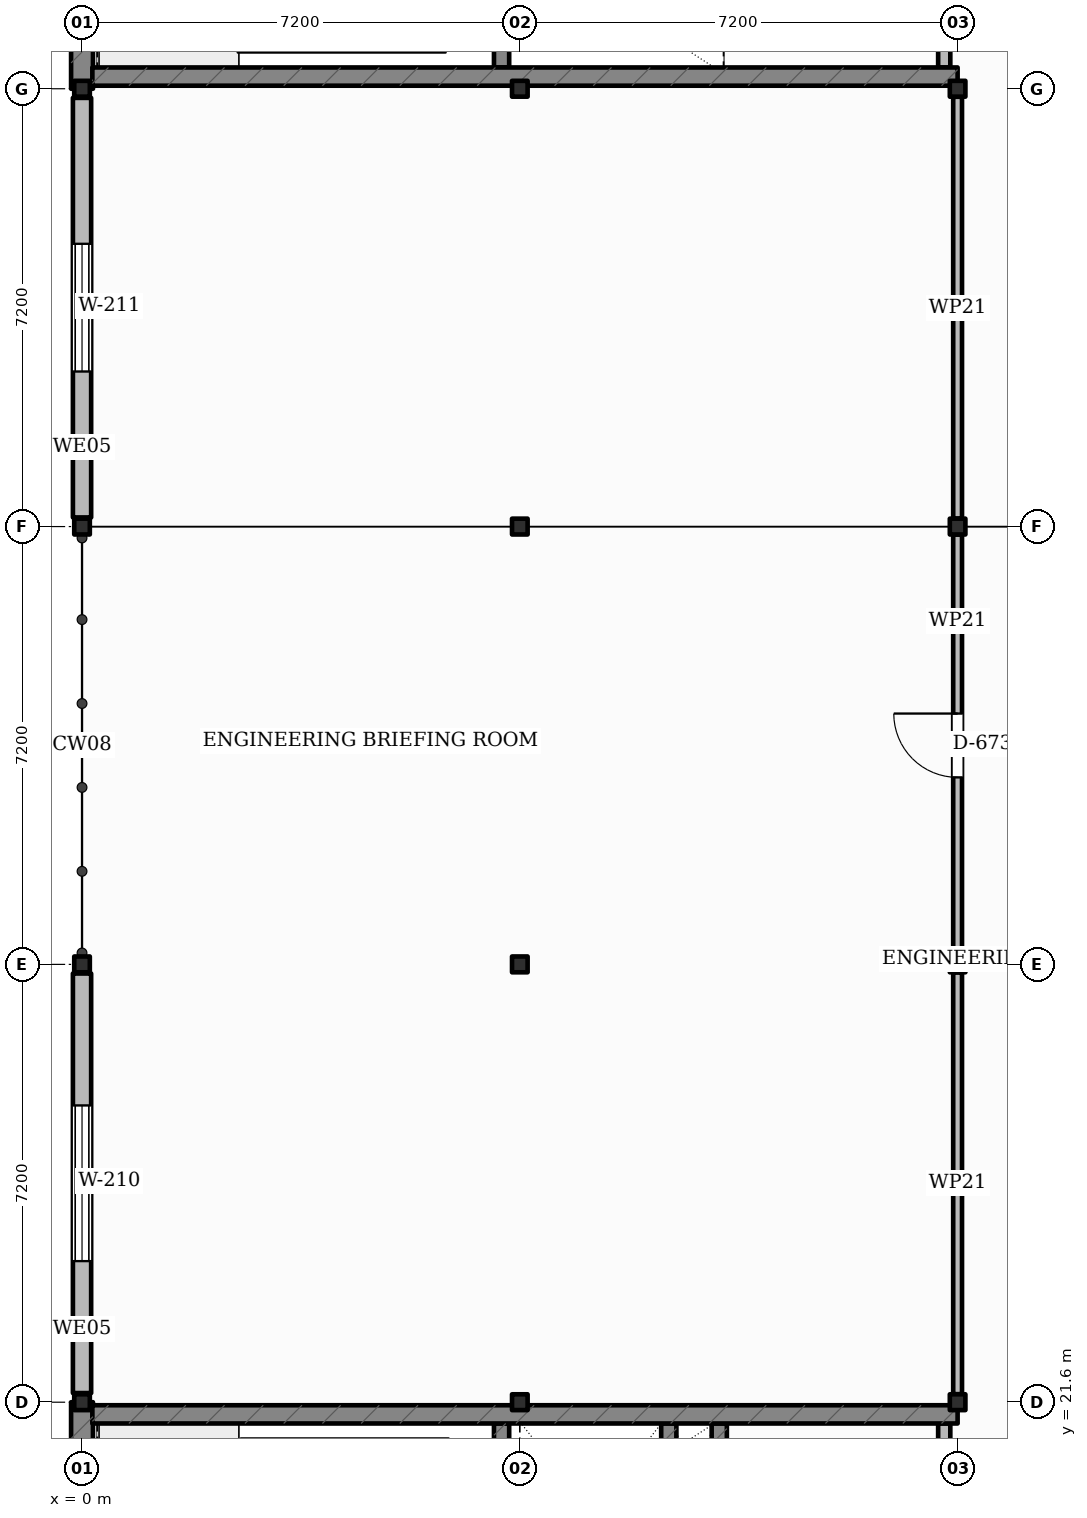
"""IFC4 building model, lengths in metres.
Left out: names, types, materials, properties, quantities, classifications, styles, units other than length and angle.
Written with IfcOpenShell. Run it as: python <this file> out.ifc"""

import sys

from ifc_helpers import new_model, si_unit, direction, frame, frame_2d, origin, origin_2d, place, context, subcontext, project, spatial, rectangle, i_section, extrude, element, fill, save


model = new_model("IFC4")
c1 = context("Model", 3, precision=1e-05, world=origin(), true_north=direction((0.0, 1.0)))
c2 = subcontext(c1, "Body", "Model", "MODEL_VIEW")
j1 = project(units=[si_unit("LENGTHUNIT", "METRE"), si_unit("PLANEANGLEUNIT", "RADIAN")], contexts=[c1])
p1 = place(None, origin())
s1 = spatial("IfcSite", under=j1, at=p1, CompositionType="ELEMENT")
p2 = place(p1, origin())
s2 = spatial("IfcBuilding", under=s1, at=p2, CompositionType="ELEMENT")
p3 = place(p2, frame((0.0, 0.0, 14.4)))
s3 = spatial("IfcBuildingStorey", under=s2, at=p3, CompositionType="ELEMENT", Elevation=14.4)
for number, where, z_axis, x_axis in (
    (1, (0.0, 21.6, 0.0), (0.0, 0.0, 1.0), (1.0, 0.0, 0.0)),
    (2, (0.0, 28.8, 0.0), (0.0, 0.0, 1.0), (1.0, 0.0, 0.0)),
    (3, (0.0, 36.0, 0.0), (0.0, 0.0, 1.0), (1.0, 0.0, 0.0)),
    (4, (0.0, 43.2, 0.0), (0.0, 0.0, 1.0), (1.0, 0.0, 0.0)),
    (5, (7.2, 21.6, 0.0), (0.0, 0.0, 1.0), (1.0, 0.0, 0.0)),
    (6, (7.2, 28.8, 0.0), (0.0, 0.0, 1.0), (1.0, 0.0, 0.0)),
    (7, (7.2, 36.0, 0.0), (0.0, 0.0, 1.0), (1.0, 0.0, 0.0)),
    (8, (7.2, 43.2, 0.0), (0.0, 0.0, 1.0), (1.0, 0.0, 0.0)),
    (9, (14.4, 21.6, 0.0), (0.0, 0.0, 1.0), (1.0, 0.0, 0.0)),
    (10, (14.4, 28.8, 0.0), (0.0, 0.0, 1.0), (1.0, 0.0, 0.0)),
    (11, (14.4, 36.0, 0.0), (0.0, 0.0, 1.0), (1.0, 0.0, 0.0)),
    (12, (14.4, 43.2, 0.0), (0.0, 0.0, 1.0), (1.0, 0.0, 0.0)),
):
    element("IfcColumn", number, at=place(p3, frame(where, z_axis=z_axis, x_axis=x_axis)), inside=s3, PredefinedType="COLUMN", context=c2, shape_type="SweptSolid", body=[
        extrude(i_section(OverallWidth=0.256, OverallDepth=0.26, WebThickness=0.01, FlangeThickness=0.017, FilletRadius=0.013, at=origin_2d()), origin(), (0.0, 0.0, 1.0), 4.5),
    ])
p4 = place(p3, frame((0.0, 14.4, 0.0), z_axis=(0.0, 0.0, 1.0), x_axis=(0.0, 1.0, 0.0)))
e13 = element("IfcWall", 13, at=p4, inside=s3, PredefinedType="SHEAR", context=c2, shape_type="SweptSolid", body=[
    extrude(rectangle(XDim=7.2, YDim=0.36, at=frame_2d((3.6, 0.0))), origin(), (0.0, 0.0, 1.0), 3.85),
])
p5 = place(p3, frame((0.0, 21.75, 0.0), z_axis=(0.0, 0.0, 1.0), x_axis=(0.0, 1.0, 0.0)))
e14 = element("IfcWall", 14, at=p5, inside=s3, PredefinedType="SOLIDWALL", context=c2, shape_type="SweptSolid", body=[
    extrude(rectangle(XDim=6.9, YDim=0.3, at=frame_2d((3.45, 0.0))), origin(), (0.0, 0.0, 1.0), 3.85),
])
p6 = place(p5, frame((2.17, 0.0, 1.05)))
e15 = element("IfcOpeningElement", 15, at=p6, cuts=e14, PredefinedType="OPENING", context=c2, shape_type="SweptSolid", body=[
    extrude(rectangle(XDim=2.56, YDim=1.55, at=frame_2d((1.28, 0.775))), frame((0.0, 0.16, 0.0), z_axis=(0.0, -1.0, 0.0), x_axis=(1.0, 0.0, 0.0)), (0.0, 0.0, 1.0), 0.32),
])
p7 = place(p3, frame((0.0, 36.15, 0.0), z_axis=(0.0, 0.0, 1.0), x_axis=(0.0, 1.0, 0.0)))
e16 = element("IfcWall", 16, at=p7, inside=s3, PredefinedType="SOLIDWALL", context=c2, shape_type="SweptSolid", body=[
    extrude(rectangle(XDim=6.9, YDim=0.3, at=frame_2d((3.45, 0.0))), origin(), (0.0, 0.0, 1.0), 3.85),
])
p8 = place(p7, frame((2.4, 0.0, 1.05)))
e17 = element("IfcOpeningElement", 17, at=p8, cuts=e16, PredefinedType="OPENING", context=c2, shape_type="SweptSolid", body=[
    extrude(rectangle(XDim=2.1, YDim=1.8, at=frame_2d((1.05, 0.9))), frame((0.0, 0.16, 0.0), z_axis=(0.0, -1.0, 0.0), x_axis=(1.0, 0.0, 0.0)), (0.0, 0.0, 1.0), 0.32),
])
p9 = place(p3, frame((0.0, 43.2, 0.0), z_axis=(0.0, 0.0, 1.0), x_axis=(0.0, 1.0, 0.0)))
e18 = element("IfcWall", 18, at=p9, inside=s3, PredefinedType="SHEAR", context=c2, shape_type="SweptSolid", body=[
    extrude(rectangle(XDim=7.2, YDim=0.36, at=frame_2d((3.6, 0.0))), origin(), (0.0, 0.0, 1.0), 3.85),
])
p10 = place(p3, frame((6.9, 14.75, 0.0), z_axis=(0.0, 0.0, 1.0), x_axis=(0.0, 1.0, 0.0)))
e19 = element("IfcWall", 19, at=p10, inside=s3, PredefinedType="SHEAR", context=c2, shape_type="SweptSolid", body=[
    extrude(rectangle(XDim=6.5, YDim=0.25, at=frame_2d((3.25, 0.0))), origin(), (0.0, 0.0, 1.0), 3.6),
])
p11 = place(p10, frame((0.95, 0.0, 0.0)))
e20 = element("IfcOpeningElement", 20, at=p11, cuts=e19, PredefinedType="OPENING", context=c2, shape_type="SweptSolid", body=[
    extrude(rectangle(XDim=1.35, YDim=2.15, at=frame_2d((0.675, 1.075))), frame((0.0, 0.135, 0.0), z_axis=(0.0, -1.0, 0.0), x_axis=(1.0, 0.0, 0.0)), (0.0, 0.0, 1.0), 0.27),
])
p12 = place(p3, frame((9.65, 18.285, 0.0), z_axis=(0.0, 0.0, 1.0), x_axis=(0.0, 1.0, 0.0)))
e21 = element("IfcWall", 21, at=p12, inside=s3, PredefinedType="SHEAR", context=c2, shape_type="SweptSolid", body=[
    extrude(rectangle(XDim=2.965, YDim=0.25, at=frame_2d((1.482, 0.0))), origin(), (0.0, 0.0, 1.0), 3.6),
])
p13 = place(p3, frame((10.48, 18.285, 0.0), z_axis=(0.0, 0.0, 1.0), x_axis=(0.0, 1.0, 0.0)))
e22 = element("IfcWall", 22, at=p13, inside=s3, PredefinedType="SHEAR", context=c2, shape_type="SweptSolid", body=[
    extrude(rectangle(XDim=2.965, YDim=0.25, at=frame_2d((1.482, 0.0))), origin(), (0.0, 0.0, 1.0), 3.6),
])
p14 = place(p13, frame((0.9, 0.0, 0.0)))
e23 = element("IfcOpeningElement", 23, at=p14, cuts=e22, PredefinedType="OPENING", context=c2, shape_type="SweptSolid", body=[
    extrude(rectangle(XDim=0.92, YDim=2.05, at=frame_2d((0.46, 1.025))), frame((0.0, 0.135, 0.0), z_axis=(0.0, -1.0, 0.0), x_axis=(1.0, 0.0, 0.0)), (0.0, 0.0, 1.0), 0.27),
])
p15 = place(p3, frame((14.18, 14.75, 0.0), z_axis=(0.0, 0.0, 1.0), x_axis=(0.0, 1.0, 0.0)))
e24 = element("IfcWall", 24, at=p15, inside=s3, PredefinedType="SOLIDWALL", context=c2, shape_type="SweptSolid", body=[
    extrude(rectangle(XDim=6.5, YDim=0.2, at=frame_2d((3.25, 0.0))), origin(), (0.0, 0.0, 1.0), 3.6),
])
p16 = place(p15, frame((2.5, 0.0, 0.0)))
e25 = element("IfcOpeningElement", 25, at=p16, cuts=e24, PredefinedType="OPENING", context=c2, shape_type="SweptSolid", body=[
    extrude(rectangle(XDim=1.5, YDim=2.15, at=frame_2d((0.75, 1.075))), frame((0.0, 0.11, 0.0), z_axis=(0.0, -1.0, 0.0), x_axis=(1.0, 0.0, 0.0)), (0.0, 0.0, 1.0), 0.22),
])
p17 = place(p3, frame((0.17, 21.4, 0.0), z_axis=(0.0, 0.0, 1.0), x_axis=(1.0, 0.0, 0.0)))
e26 = element("IfcWall", 26, at=p17, inside=s3, PredefinedType="SHEAR", context=c2, shape_type="SweptSolid", body=[
    extrude(rectangle(XDim=14.23, YDim=0.3, at=frame_2d((7.115, 0.0))), origin(), (0.0, 0.0, 1.0), 3.6),
])
p18 = place(p3, frame((6.9, 43.55, 0.0), z_axis=(0.0, 0.0, 1.0), x_axis=(0.0, 1.0, 0.0)))
e27 = element("IfcWall", 27, at=p18, inside=s3, PredefinedType="SHEAR", context=c2, shape_type="SweptSolid", body=[
    extrude(rectangle(XDim=6.5, YDim=0.25, at=frame_2d((3.25, 0.0))), origin(), (0.0, 0.0, 1.0), 3.6),
])
p19 = place(p18, frame((0.95, 0.0, 0.0)))
e28 = element("IfcOpeningElement", 28, at=p19, cuts=e27, PredefinedType="OPENING", context=c2, shape_type="SweptSolid", body=[
    extrude(rectangle(XDim=1.35, YDim=2.15, at=frame_2d((0.675, 1.075))), frame((0.0, 0.135, 0.0), z_axis=(0.0, -1.0, 0.0), x_axis=(1.0, 0.0, 0.0)), (0.0, 0.0, 1.0), 0.27),
])
p20 = place(p3, frame((14.18, 43.55, 0.0), z_axis=(0.0, 0.0, 1.0), x_axis=(0.0, 1.0, 0.0)))
e29 = element("IfcWall", 29, at=p20, inside=s3, PredefinedType="SOLIDWALL", context=c2, shape_type="SweptSolid", body=[
    extrude(rectangle(XDim=6.5, YDim=0.2, at=frame_2d((3.25, 0.0))), origin(), (0.0, 0.0, 1.0), 3.6),
])
p21 = place(p20, frame((2.5, 0.0, 0.0)))
e30 = element("IfcOpeningElement", 30, at=p21, cuts=e29, PredefinedType="OPENING", context=c2, shape_type="SweptSolid", body=[
    extrude(rectangle(XDim=1.5, YDim=2.15, at=frame_2d((0.75, 1.075))), frame((0.0, 0.11, 0.0), z_axis=(0.0, -1.0, 0.0), x_axis=(1.0, 0.0, 0.0)), (0.0, 0.0, 1.0), 0.22),
])
p22 = place(p3, frame((0.17, 43.4, 0.0), z_axis=(0.0, 0.0, 1.0), x_axis=(1.0, 0.0, 0.0)))
e31 = element("IfcWall", 31, at=p22, inside=s3, PredefinedType="SHEAR", context=c2, shape_type="SweptSolid", body=[
    extrude(rectangle(XDim=14.23, YDim=0.3, at=frame_2d((7.115, 0.0))), origin(), (0.0, 0.0, 1.0), 3.6),
])
p23 = place(p3, frame((14.4, 21.732, 0.0), z_axis=(0.0, 0.0, 1.0), x_axis=(0.0, 1.0, 0.0)))
e32 = element("IfcWall", 32, at=p23, inside=s3, PredefinedType="PARTITIONING", context=c2, shape_type="SweptSolid", body=[
    extrude(rectangle(XDim=6.936, YDim=0.145, at=frame_2d((3.468, 0.0))), origin(), (0.0, 0.0, 1.0), 3.55),
])
p24 = place(p3, frame((14.4, 28.932, 0.0), z_axis=(0.0, 0.0, 1.0), x_axis=(0.0, 1.0, 0.0)))
e33 = element("IfcWall", 33, at=p24, inside=s3, PredefinedType="PARTITIONING", context=c2, shape_type="SweptSolid", body=[
    extrude(rectangle(XDim=6.936, YDim=0.145, at=frame_2d((3.468, 0.0))), origin(), (0.0, 0.0, 1.0), 3.55),
])
p25 = place(p24, frame((2.943, 0.0, 0.0)))
e34 = element("IfcOpeningElement", 34, at=p25, cuts=e33, PredefinedType="OPENING", context=c2, shape_type="SweptSolid", body=[
    extrude(rectangle(XDim=1.05, YDim=2.15, at=frame_2d((0.525, 1.075))), frame((0.0, 0.083, 0.0), z_axis=(0.0, -1.0, 0.0), x_axis=(1.0, 0.0, 0.0)), (0.0, 0.0, 1.0), 0.165),
])
p26 = place(p3, frame((14.4, 36.132, 0.0), z_axis=(0.0, 0.0, 1.0), x_axis=(0.0, 1.0, 0.0)))
e35 = element("IfcWall", 35, at=p26, inside=s3, PredefinedType="PARTITIONING", context=c2, shape_type="SweptSolid", body=[
    extrude(rectangle(XDim=6.936, YDim=0.145, at=frame_2d((3.468, 0.0))), origin(), (0.0, 0.0, 1.0), 3.55),
])
p27 = place(p6, origin())
e36 = element("IfcWindow", 36, at=p27, inside=s3, PartitioningType="SINGLE_PANEL", PredefinedType="WINDOW", context=c2, shape_type="SweptSolid", body=[
    extrude(rectangle(XDim=2.56, YDim=1.55, at=frame_2d((1.28, 0.775))), frame((0.0, 0.03, 0.0), z_axis=(0.0, -1.0, 0.0), x_axis=(1.0, 0.0, 0.0)), (0.0, 0.0, 1.0), 0.06),
])
fill(e15, e36)
p28 = place(p8, origin())
e37 = element("IfcWindow", 37, at=p28, inside=s3, PartitioningType="SINGLE_PANEL", PredefinedType="WINDOW", context=c2, shape_type="SweptSolid", body=[
    extrude(rectangle(XDim=2.1, YDim=1.8, at=frame_2d((1.05, 0.9))), frame((0.0, 0.03, 0.0), z_axis=(0.0, -1.0, 0.0), x_axis=(1.0, 0.0, 0.0)), (0.0, 0.0, 1.0), 0.06),
])
fill(e17, e37)
p29 = place(p25, origin())
e38 = element("IfcDoor", 38, at=p29, inside=s3, OperationType="SINGLE_SWING_RIGHT", PredefinedType="DOOR", context=c2, shape_type="SweptSolid", body=[
    extrude(rectangle(XDim=1.05, YDim=2.15, at=frame_2d((0.525, 1.075))), frame((0.0, 0.025, 0.0), z_axis=(0.0, -1.0, 0.0), x_axis=(1.0, 0.0, 0.0)), (0.0, 0.0, 1.0), 0.05),
])
fill(e34, e38)
save(model, sys.argv[1])
